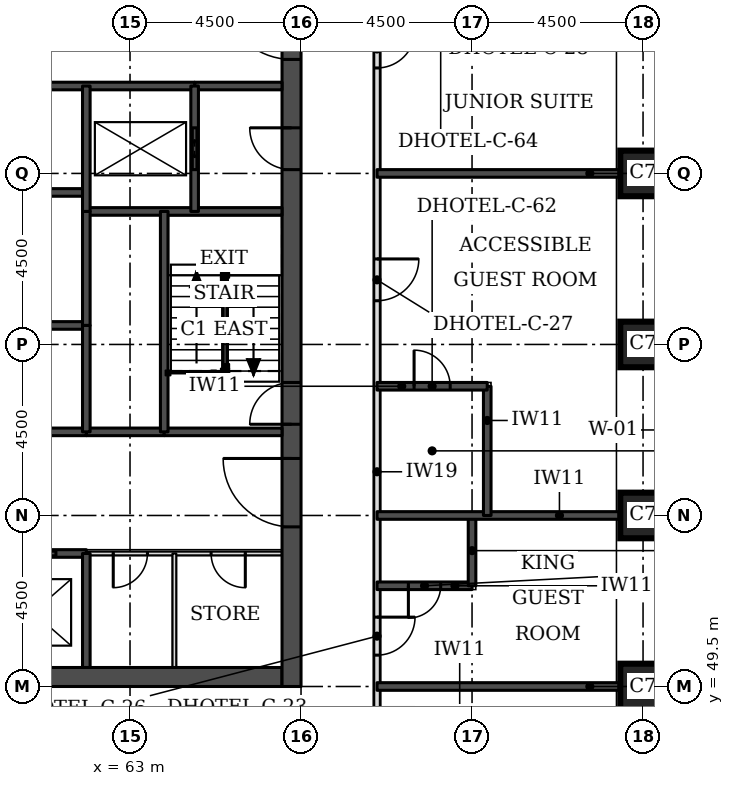
"""IFC4 building model, lengths in metres.
Left out: names, types, materials, properties, quantities, classifications, styles, units other than length and angle.
Written with IfcOpenShell. Run it as: python <this file> out.ifc"""

import sys

from ifc_helpers import new_model, si_unit, direction, frame, frame_2d, origin, origin_2d, place, context, subcontext, project, spatial, rectangle, extrude, element, fill, save


model = new_model("IFC4")
c1 = context("Model", 3, precision=1e-05, world=origin(), true_north=direction((0.0, 1.0)))
c2 = subcontext(c1, "Body", "Model", "MODEL_VIEW")
j1 = project(units=[si_unit("LENGTHUNIT", "METRE"), si_unit("PLANEANGLEUNIT", "RADIAN")], contexts=[c1])
p1 = place(None, origin())
s1 = spatial("IfcSite", under=j1, at=p1, CompositionType="ELEMENT")
p2 = place(p1, origin())
s2 = spatial("IfcBuilding", under=s1, at=p2, CompositionType="ELEMENT")
p3 = place(p2, frame((0.0, 0.0, 56.1)))
s3 = spatial("IfcBuildingStorey", under=s2, at=p3, CompositionType="ELEMENT", Elevation=56.1)
for number, where, z_axis, x_axis in (
    (1, (76.5, 49.5, 0.0), (0.0, 0.0, 1.0), (1.0, 0.0, 0.0)),
    (2, (76.5, 54.0, 0.0), (0.0, 0.0, 1.0), (1.0, 0.0, 0.0)),
    (3, (76.5, 58.5, 0.0), (0.0, 0.0, 1.0), (1.0, 0.0, 0.0)),
    (4, (76.5, 63.0, 0.0), (0.0, 0.0, 1.0), (1.0, 0.0, 0.0)),
):
    element("IfcColumn", number, at=place(p3, frame(where, z_axis=z_axis, x_axis=x_axis)), inside=s3, PredefinedType="COLUMN", context=c2, shape_type="SweptSolid", body=[
        extrude(rectangle(XDim=1.2, YDim=1.2, at=origin_2d()), origin(), (0.0, 0.0, 1.0), 3.3),
    ])
p4 = place(p3, frame((45.5, 49.75, 0.0), z_axis=(0.0, 0.0, 1.0), x_axis=(1.0, 0.0, 0.0)))
e5 = element("IfcWall", 5, at=p4, inside=s3, PredefinedType="SHEAR", context=c2, shape_type="SweptSolid", body=[
    extrude(rectangle(XDim=21.5, YDim=0.5, at=frame_2d((10.75, 0.0))), origin(), (0.0, 0.0, 1.0), 3.3),
])
p5 = place(p3, frame((67.25, 49.5, 0.0), z_axis=(0.0, 0.0, 1.0), x_axis=(0.0, 1.0, 0.0)))
e6 = element("IfcWall", 6, at=p5, inside=s3, PredefinedType="SHEAR", context=c2, shape_type="SweptSolid", body=[
    extrude(rectangle(XDim=22.5, YDim=0.5, at=frame_2d((11.25, 0.0))), origin(), (0.0, 0.0, 1.0), 3.3),
])
p6 = place(p5, frame((4.2, 0.0, 0.0)))
e7 = element("IfcOpeningElement", 7, at=p6, cuts=e6, PredefinedType="OPENING", context=c2, shape_type="SweptSolid", body=[
    extrude(rectangle(XDim=1.8, YDim=2.1, at=frame_2d((0.9, 1.05))), frame((0.0, 0.26, 0.0), z_axis=(0.0, -1.0, 0.0), x_axis=(1.0, 0.0, 0.0)), (0.0, 0.0, 1.0), 0.52),
])
p7 = place(p5, frame((6.9, 0.0, 0.0)))
e8 = element("IfcOpeningElement", 8, at=p7, cuts=e6, PredefinedType="OPENING", context=c2, shape_type="SweptSolid", body=[
    extrude(rectangle(XDim=1.1, YDim=2.1, at=frame_2d((0.55, 1.05))), frame((0.0, 0.26, 0.0), z_axis=(0.0, -1.0, 0.0), x_axis=(1.0, 0.0, 0.0)), (0.0, 0.0, 1.0), 0.52),
])
p8 = place(p5, frame((13.6, 0.0, 0.0)))
e9 = element("IfcOpeningElement", 9, at=p8, cuts=e6, PredefinedType="OPENING", context=c2, shape_type="SweptSolid", body=[
    extrude(rectangle(XDim=1.1, YDim=2.1, at=frame_2d((0.55, 1.05))), frame((0.0, 0.26, 0.0), z_axis=(0.0, -1.0, 0.0), x_axis=(1.0, 0.0, 0.0)), (0.0, 0.0, 1.0), 0.52),
])
p9 = place(p5, frame((16.5, 0.0, 0.0)))
e10 = element("IfcOpeningElement", 10, at=p9, cuts=e6, PredefinedType="OPENING", context=c2, shape_type="SweptSolid", body=[
    extrude(rectangle(XDim=1.8, YDim=2.1, at=frame_2d((0.9, 1.05))), frame((0.0, 0.26, 0.0), z_axis=(0.0, -1.0, 0.0), x_axis=(1.0, 0.0, 0.0)), (0.0, 0.0, 1.0), 0.52),
])
p10 = place(p3, frame((69.5, 47.5, 0.0), z_axis=(0.0, 0.0, 1.0), x_axis=(0.0, 1.0, 0.0)))
e11 = element("IfcWall", 11, at=p10, inside=s3, PredefinedType="PARTITIONING", context=c2, shape_type="SweptSolid", body=[
    extrude(rectangle(XDim=26.5, YDim=0.15, at=frame_2d((13.25, 0.0))), origin(), (0.0, 0.0, 1.0), 3.08),
])
p11 = place(p10, frame((25.053, 0.0, 0.0)))
e12 = element("IfcOpeningElement", 12, at=p11, cuts=e11, PredefinedType="OPENING", context=c2, shape_type="SweptSolid", body=[
    extrude(rectangle(XDim=1.0, YDim=2.1, at=frame_2d((0.5, 1.05))), frame((0.0, 0.085, 0.0), z_axis=(0.0, -1.0, 0.0), x_axis=(1.0, 0.0, 0.0)), (0.0, 0.0, 1.0), 0.17),
])
p12 = place(p10, frame((18.275, 0.0, 0.0)))
e13 = element("IfcOpeningElement", 13, at=p12, cuts=e11, PredefinedType="OPENING", context=c2, shape_type="SweptSolid", body=[
    extrude(rectangle(XDim=1.0, YDim=2.1, at=frame_2d((0.5, 1.05))), frame((0.0, 0.085, 0.0), z_axis=(0.0, -1.0, 0.0), x_axis=(1.0, 0.0, 0.0)), (0.0, 0.0, 1.0), 0.17),
])
p13 = place(p10, frame((12.15, 0.0, 0.0)))
e14 = element("IfcOpeningElement", 14, at=p13, cuts=e11, PredefinedType="OPENING", context=c2, shape_type="SweptSolid", body=[
    extrude(rectangle(XDim=1.1, YDim=2.1, at=frame_2d((0.55, 1.05))), frame((0.0, 0.085, 0.0), z_axis=(0.0, -1.0, 0.0), x_axis=(1.0, 0.0, 0.0)), (0.0, 0.0, 1.0), 0.17),
])
p14 = place(p10, frame((2.825, 0.0, 0.0)))
e15 = element("IfcOpeningElement", 15, at=p14, cuts=e11, PredefinedType="OPENING", context=c2, shape_type="SweptSolid", body=[
    extrude(rectangle(XDim=1.0, YDim=2.1, at=frame_2d((0.5, 1.05))), frame((0.0, 0.085, 0.0), z_axis=(0.0, -1.0, 0.0), x_axis=(1.0, 0.0, 0.0)), (0.0, 0.0, 1.0), 0.17),
])
p15 = place(p10, frame((0.447, 0.0, 0.0)))
e16 = element("IfcOpeningElement", 16, at=p15, cuts=e11, PredefinedType="OPENING", context=c2, shape_type="SweptSolid", body=[
    extrude(rectangle(XDim=1.0, YDim=2.1, at=frame_2d((0.5, 1.05))), frame((0.0, 0.085, 0.0), z_axis=(0.0, -1.0, 0.0), x_axis=(1.0, 0.0, 0.0)), (0.0, 0.0, 1.0), 0.17),
])
p16 = place(p3, frame((69.5, 49.5, 0.0), z_axis=(0.0, 0.0, 1.0), x_axis=(1.0, 0.0, 0.0)))
e17 = element("IfcWall", 17, at=p16, inside=s3, PredefinedType="SOLIDWALL", context=c2, shape_type="SweptSolid", body=[
    extrude(rectangle(XDim=6.4, YDim=0.2, at=frame_2d((3.2, 0.0))), origin(), (0.0, 0.0, 1.0), 3.08),
])
p17 = place(p3, frame((69.5, 52.15, 0.0), z_axis=(0.0, 0.0, 1.0), x_axis=(1.0, 0.0, 0.0)))
e18 = element("IfcWall", 18, at=p17, inside=s3, PredefinedType="SOLIDWALL", context=c2, shape_type="SweptSolid", body=[
    extrude(rectangle(XDim=2.5, YDim=0.2, at=frame_2d((1.25, 0.0))), origin(), (0.0, 0.0, 1.0), 3.08),
])
p18 = place(p17, frame((0.825, 0.0, 0.0)))
e19 = element("IfcOpeningElement", 19, at=p18, cuts=e18, PredefinedType="OPENING", context=c2, shape_type="SweptSolid", body=[
    extrude(rectangle(XDim=0.85, YDim=2.1, at=frame_2d((0.425, 1.05))), frame((0.0, 0.11, 0.0), z_axis=(0.0, -1.0, 0.0), x_axis=(1.0, 0.0, 0.0)), (0.0, 0.0, 1.0), 0.22),
])
p19 = place(p3, frame((72.0, 52.15, 0.0), z_axis=(0.0, 0.0, 1.0), x_axis=(0.0, 1.0, 0.0)))
e20 = element("IfcWall", 20, at=p19, inside=s3, PredefinedType="SOLIDWALL", context=c2, shape_type="SweptSolid", body=[
    extrude(rectangle(XDim=1.85, YDim=0.2, at=frame_2d((0.925, 0.0))), origin(), (0.0, 0.0, 1.0), 3.08),
])
p20 = place(p3, frame((69.5, 54.0, 0.0), z_axis=(0.0, 0.0, 1.0), x_axis=(1.0, 0.0, 0.0)))
e21 = element("IfcWall", 21, at=p20, inside=s3, PredefinedType="SOLIDWALL", context=c2, shape_type="SweptSolid", body=[
    extrude(rectangle(XDim=6.4, YDim=0.2, at=frame_2d((3.2, 0.0))), origin(), (0.0, 0.0, 1.0), 3.08),
])
p21 = place(p3, frame((72.4, 54.0, 0.0), z_axis=(0.0, 0.0, 1.0), x_axis=(0.0, 1.0, 0.0)))
e22 = element("IfcWall", 22, at=p21, inside=s3, PredefinedType="SOLIDWALL", context=c2, shape_type="SweptSolid", body=[
    extrude(rectangle(XDim=3.4, YDim=0.2, at=frame_2d((1.7, 0.0))), origin(), (0.0, 0.0, 1.0), 3.08),
])
p22 = place(p3, frame((69.5, 57.4, 0.0), z_axis=(0.0, 0.0, 1.0), x_axis=(1.0, 0.0, 0.0)))
e23 = element("IfcWall", 23, at=p22, inside=s3, PredefinedType="SOLIDWALL", context=c2, shape_type="SweptSolid", body=[
    extrude(rectangle(XDim=2.9, YDim=0.2, at=frame_2d((1.45, 0.0))), origin(), (0.0, 0.0, 1.0), 3.08),
])
p23 = place(p22, frame((0.975, 0.0, 0.0)))
e24 = element("IfcOpeningElement", 24, at=p23, cuts=e23, PredefinedType="OPENING", context=c2, shape_type="SweptSolid", body=[
    extrude(rectangle(XDim=0.95, YDim=2.1, at=frame_2d((0.475, 1.05))), frame((0.0, 0.11, 0.0), z_axis=(0.0, -1.0, 0.0), x_axis=(1.0, 0.0, 0.0)), (0.0, 0.0, 1.0), 0.22),
])
p24 = place(p3, frame((69.5, 63.0, 0.0), z_axis=(0.0, 0.0, 1.0), x_axis=(1.0, 0.0, 0.0)))
e25 = element("IfcWall", 25, at=p24, inside=s3, PredefinedType="SOLIDWALL", context=c2, shape_type="SweptSolid", body=[
    extrude(rectangle(XDim=6.4, YDim=0.2, at=frame_2d((3.2, 0.0))), origin(), (0.0, 0.0, 1.0), 3.08),
])
p25 = place(p3, frame((61.85, 53.0, 0.0), z_axis=(0.0, 0.0, 1.0), x_axis=(1.0, 0.0, 0.0)))
e26 = element("IfcWall", 26, at=p25, inside=s3, PredefinedType="PARTITIONING", context=c2, shape_type="SweptSolid", body=[
    extrude(rectangle(XDim=5.15, YDim=0.1, at=frame_2d((2.575, 0.0))), origin(), (0.0, 0.0, 1.0), 3.08),
])
p26 = place(p25, frame((3.284, 0.0, 0.0)))
e27 = element("IfcOpeningElement", 27, at=p26, cuts=e26, PredefinedType="OPENING", context=c2, shape_type="SweptSolid", body=[
    extrude(rectangle(XDim=0.9, YDim=2.1, at=frame_2d((0.45, 1.05))), frame((0.0, 0.06, 0.0), z_axis=(0.0, -1.0, 0.0), x_axis=(1.0, 0.0, 0.0)), (0.0, 0.0, 1.0), 0.12),
])
p27 = place(p25, frame((0.709, 0.0, 0.0)))
e28 = element("IfcOpeningElement", 28, at=p27, cuts=e26, PredefinedType="OPENING", context=c2, shape_type="SweptSolid", body=[
    extrude(rectangle(XDim=0.9, YDim=2.1, at=frame_2d((0.45, 1.05))), frame((0.0, 0.06, 0.0), z_axis=(0.0, -1.0, 0.0), x_axis=(1.0, 0.0, 0.0)), (0.0, 0.0, 1.0), 0.12),
])
p28 = place(p3, frame((50.65, 53.0, 0.0), z_axis=(0.0, 0.0, 1.0), x_axis=(1.0, 0.0, 0.0)))
e29 = element("IfcWall", 29, at=p28, inside=s3, PredefinedType="SOLIDWALL", context=c2, shape_type="SweptSolid", body=[
    extrude(rectangle(XDim=11.2, YDim=0.2, at=frame_2d((5.6, 0.0))), origin(), (0.0, 0.0, 1.0), 3.08),
])
p29 = place(p28, frame((0.8, 0.0, 0.0)))
e30 = element("IfcOpeningElement", 30, at=p29, cuts=e29, PredefinedType="OPENING", context=c2, shape_type="SweptSolid", body=[
    extrude(rectangle(XDim=1.2, YDim=2.1, at=frame_2d((0.6, 1.05))), frame((0.0, 0.11, 0.0), z_axis=(0.0, -1.0, 0.0), x_axis=(1.0, 0.0, 0.0)), (0.0, 0.0, 1.0), 0.22),
])
p30 = place(p28, frame((3.6, 0.0, 0.0)))
e31 = element("IfcOpeningElement", 31, at=p30, cuts=e29, PredefinedType="OPENING", context=c2, shape_type="SweptSolid", body=[
    extrude(rectangle(XDim=1.2, YDim=2.1, at=frame_2d((0.6, 1.05))), frame((0.0, 0.11, 0.0), z_axis=(0.0, -1.0, 0.0), x_axis=(1.0, 0.0, 0.0)), (0.0, 0.0, 1.0), 0.22),
])
p31 = place(p28, frame((6.4, 0.0, 0.0)))
e32 = element("IfcOpeningElement", 32, at=p31, cuts=e29, PredefinedType="OPENING", context=c2, shape_type="SweptSolid", body=[
    extrude(rectangle(XDim=1.2, YDim=2.1, at=frame_2d((0.6, 1.05))), frame((0.0, 0.11, 0.0), z_axis=(0.0, -1.0, 0.0), x_axis=(1.0, 0.0, 0.0)), (0.0, 0.0, 1.0), 0.22),
])
p32 = place(p28, frame((9.2, 0.0, 0.0)))
e33 = element("IfcOpeningElement", 33, at=p32, cuts=e29, PredefinedType="OPENING", context=c2, shape_type="SweptSolid", body=[
    extrude(rectangle(XDim=1.2, YDim=2.1, at=frame_2d((0.6, 1.05))), frame((0.0, 0.11, 0.0), z_axis=(0.0, -1.0, 0.0), x_axis=(1.0, 0.0, 0.0)), (0.0, 0.0, 1.0), 0.22),
])
p33 = place(p3, frame((61.85, 56.2, 0.0), z_axis=(0.0, 0.0, 1.0), x_axis=(1.0, 0.0, 0.0)))
e34 = element("IfcWall", 34, at=p33, inside=s3, PredefinedType="SOLIDWALL", context=c2, shape_type="SweptSolid", body=[
    extrude(rectangle(XDim=2.05, YDim=0.2, at=frame_2d((1.025, 0.0))), origin(), (0.0, 0.0, 1.0), 3.08),
])
p34 = place(p3, frame((50.65, 56.2, 0.0), z_axis=(0.0, 0.0, 1.0), x_axis=(1.0, 0.0, 0.0)))
e35 = element("IfcWall", 35, at=p34, inside=s3, PredefinedType="SOLIDWALL", context=c2, shape_type="SweptSolid", body=[
    extrude(rectangle(XDim=11.2, YDim=0.2, at=frame_2d((5.6, 0.0))), origin(), (0.0, 0.0, 1.0), 3.08),
])
p35 = place(p3, frame((63.9, 56.2, 0.0), z_axis=(0.0, 0.0, 1.0), x_axis=(1.0, 0.0, 0.0)))
e36 = element("IfcWall", 36, at=p35, inside=s3, PredefinedType="SOLIDWALL", context=c2, shape_type="SweptSolid", body=[
    extrude(rectangle(XDim=3.1, YDim=0.2, at=frame_2d((1.55, 0.0))), origin(), (0.0, 0.0, 1.0), 3.08),
])
p36 = place(p3, frame((50.65, 59.0, 0.0), z_axis=(0.0, 0.0, 1.0), x_axis=(1.0, 0.0, 0.0)))
e37 = element("IfcWall", 37, at=p36, inside=s3, PredefinedType="SOLIDWALL", context=c2, shape_type="SweptSolid", body=[
    extrude(rectangle(XDim=11.2, YDim=0.2, at=frame_2d((5.6, 0.0))), origin(), (0.0, 0.0, 1.0), 3.3),
])
p37 = place(p3, frame((61.85, 62.0, 0.0), z_axis=(0.0, 0.0, 1.0), x_axis=(1.0, 0.0, 0.0)))
e38 = element("IfcWall", 38, at=p37, inside=s3, PredefinedType="SOLIDWALL", context=c2, shape_type="SweptSolid", body=[
    extrude(rectangle(XDim=5.15, YDim=0.2, at=frame_2d((2.575, 0.0))), origin(), (0.0, 0.0, 1.0), 3.08),
])
p38 = place(p3, frame((50.65, 62.5, 0.0), z_axis=(0.0, 0.0, 1.0), x_axis=(1.0, 0.0, 0.0)))
e39 = element("IfcWall", 39, at=p38, inside=s3, PredefinedType="SOLIDWALL", context=c2, shape_type="SweptSolid", body=[
    extrude(rectangle(XDim=11.2, YDim=0.2, at=frame_2d((5.6, 0.0))), origin(), (0.0, 0.0, 1.0), 3.3),
])
p39 = place(p3, frame((64.7, 65.3, 0.0), z_axis=(0.0, 0.0, 1.0), x_axis=(1.0, 0.0, 0.0)))
e40 = element("IfcWall", 40, at=p39, inside=s3, PredefinedType="SOLIDWALL", context=c2, shape_type="SweptSolid", body=[
    extrude(rectangle(XDim=2.3, YDim=0.2, at=frame_2d((1.15, 0.0))), origin(), (0.0, 0.0, 1.0), 3.08),
])
p40 = place(p3, frame((47.8, 65.3, 0.0), z_axis=(0.0, 0.0, 1.0), x_axis=(1.0, 0.0, 0.0)))
e41 = element("IfcWall", 41, at=p40, inside=s3, PredefinedType="SOLIDWALL", context=c2, shape_type="SweptSolid", body=[
    extrude(rectangle(XDim=16.9, YDim=0.2, at=frame_2d((8.45, 0.0))), origin(), (0.0, 0.0, 1.0), 3.08),
])
p41 = place(p3, frame((61.85, 59.0, 0.0), z_axis=(0.0, 0.0, 1.0), x_axis=(0.0, 1.0, 0.0)))
e42 = element("IfcWall", 42, at=p41, inside=s3, PredefinedType="SOLIDWALL", context=c2, shape_type="SweptSolid", body=[
    extrude(rectangle(XDim=3.0, YDim=0.2, at=frame_2d((1.5, 0.0))), origin(), (0.0, 0.0, 1.0), 3.3),
])
p42 = place(p3, frame((61.85, 50.0, 0.0), z_axis=(0.0, 0.0, 1.0), x_axis=(0.0, 1.0, 0.0)))
e43 = element("IfcWall", 43, at=p42, inside=s3, PredefinedType="SOLIDWALL", context=c2, shape_type="SweptSolid", body=[
    extrude(rectangle(XDim=3.0, YDim=0.2, at=frame_2d((1.5, 0.0))), origin(), (0.0, 0.0, 1.0), 3.08),
])
p43 = place(p3, frame((61.85, 56.2, 0.0), z_axis=(0.0, 0.0, 1.0), x_axis=(0.0, 1.0, 0.0)))
e44 = element("IfcWall", 44, at=p43, inside=s3, PredefinedType="SOLIDWALL", context=c2, shape_type="SweptSolid", body=[
    extrude(rectangle(XDim=2.8, YDim=0.2, at=frame_2d((1.4, 0.0))), origin(), (0.0, 0.0, 1.0), 3.08),
])
p44 = place(p3, frame((61.85, 62.0, 0.0), z_axis=(0.0, 0.0, 1.0), x_axis=(0.0, 1.0, 0.0)))
e45 = element("IfcWall", 45, at=p44, inside=s3, PredefinedType="SOLIDWALL", context=c2, shape_type="SweptSolid", body=[
    extrude(rectangle(XDim=3.3, YDim=0.2, at=frame_2d((1.65, 0.0))), origin(), (0.0, 0.0, 1.0), 3.08),
])
p45 = place(p3, frame((63.9, 56.2, 0.0), z_axis=(0.0, 0.0, 1.0), x_axis=(0.0, 1.0, 0.0)))
e46 = element("IfcWall", 46, at=p45, inside=s3, PredefinedType="SOLIDWALL", context=c2, shape_type="SweptSolid", body=[
    extrude(rectangle(XDim=5.8, YDim=0.2, at=frame_2d((2.9, 0.0))), origin(), (0.0, 0.0, 1.0), 3.08),
])
p46 = place(p3, frame((64.167, 50.0, 0.0), z_axis=(0.0, 0.0, 1.0), x_axis=(0.0, 1.0, 0.0)))
e47 = element("IfcWall", 47, at=p46, inside=s3, PredefinedType="PARTITIONING", context=c2, shape_type="SweptSolid", body=[
    extrude(rectangle(XDim=3.0, YDim=0.1, at=frame_2d((1.5, 0.0))), origin(), (0.0, 0.0, 1.0), 3.08),
])
p47 = place(p3, frame((64.7, 62.0, 0.0), z_axis=(0.0, 0.0, 1.0), x_axis=(0.0, 1.0, 0.0)))
e48 = element("IfcWall", 48, at=p47, inside=s3, PredefinedType="SOLIDWALL", context=c2, shape_type="SweptSolid", body=[
    extrude(rectangle(XDim=3.3, YDim=0.2, at=frame_2d((1.65, 0.0))), origin(), (0.0, 0.0, 1.0), 3.08),
])
p48 = place(p47, frame((1.1, 0.0, 0.0)))
e49 = element("IfcOpeningElement", 49, at=p48, cuts=e48, PredefinedType="OPENING", context=c2, shape_type="SweptSolid", body=[
    extrude(rectangle(XDim=1.1, YDim=2.1, at=frame_2d((0.55, 1.05))), frame((0.0, 0.11, 0.0), z_axis=(0.0, -1.0, 0.0), x_axis=(1.0, 0.0, 0.0)), (0.0, 0.0, 1.0), 0.22),
])
p49 = place(p12, frame((1.0, 0.0, 0.0), z_axis=(0.0, 0.0, 1.0), x_axis=(-1.0, 0.0, 0.0)))
e50 = element("IfcDoor", 50, at=p49, inside=s3, OperationType="SINGLE_SWING_LEFT", PredefinedType="DOOR", context=c2, shape_type="SweptSolid", body=[
    extrude(rectangle(XDim=1.0, YDim=2.1, at=frame_2d((0.5, 1.05))), frame((0.0, 0.025, 0.0), z_axis=(0.0, -1.0, 0.0), x_axis=(1.0, 0.0, 0.0)), (0.0, 0.0, 1.0), 0.05),
])
fill(e13, e50)
p50 = place(p13, frame((1.1, 0.0, 0.0), z_axis=(0.0, 0.0, 1.0), x_axis=(-1.0, 0.0, 0.0)))
e51 = element("IfcDoor", 51, at=p50, inside=s3, OperationType="SINGLE_SWING_LEFT", PredefinedType="DOOR", context=c2, shape_type="SweptSolid", body=[
    extrude(rectangle(XDim=1.1, YDim=2.1, at=frame_2d((0.55, 1.05))), frame((0.0, 0.025, 0.0), z_axis=(0.0, -1.0, 0.0), x_axis=(1.0, 0.0, 0.0)), (0.0, 0.0, 1.0), 0.05),
])
fill(e14, e51)
p51 = place(p23, origin())
e52 = element("IfcDoor", 52, at=p51, inside=s3, OperationType="SINGLE_SWING_LEFT", PredefinedType="DOOR", context=c2, shape_type="SweptSolid", body=[
    extrude(rectangle(XDim=0.95, YDim=2.1, at=frame_2d((0.475, 1.05))), frame((0.0, 0.025, 0.0), z_axis=(0.0, -1.0, 0.0), x_axis=(1.0, 0.0, 0.0)), (0.0, 0.0, 1.0), 0.05),
])
fill(e24, e52)
p52 = place(p14, frame((1.0, 0.0, 0.0), z_axis=(0.0, 0.0, 1.0), x_axis=(-1.0, 0.0, 0.0)))
e53 = element("IfcDoor", 53, at=p52, inside=s3, OperationType="SINGLE_SWING_LEFT", PredefinedType="DOOR", context=c2, shape_type="SweptSolid", body=[
    extrude(rectangle(XDim=1.0, YDim=2.1, at=frame_2d((0.5, 1.05))), frame((0.0, 0.025, 0.0), z_axis=(0.0, -1.0, 0.0), x_axis=(1.0, 0.0, 0.0)), (0.0, 0.0, 1.0), 0.05),
])
fill(e15, e53)
p53 = place(p18, frame((0.85, 0.0, 0.0), z_axis=(0.0, 0.0, 1.0), x_axis=(-1.0, 0.0, 0.0)))
e54 = element("IfcDoor", 54, at=p53, inside=s3, OperationType="SINGLE_SWING_RIGHT", PredefinedType="DOOR", context=c2, shape_type="SweptSolid", body=[
    extrude(rectangle(XDim=0.85, YDim=2.1, at=frame_2d((0.425, 1.05))), frame((0.0, 0.025, 0.0), z_axis=(0.0, -1.0, 0.0), x_axis=(1.0, 0.0, 0.0)), (0.0, 0.0, 1.0), 0.05),
])
fill(e19, e54)
p54 = place(p32, origin())
e55 = element("IfcDoor", 55, at=p54, inside=s3, OperationType="DOUBLE_DOOR_SLIDING", PredefinedType="DOOR", context=c2, shape_type="SweptSolid", body=[
    extrude(rectangle(XDim=1.2, YDim=2.1, at=frame_2d((0.6, 1.05))), frame((0.0, 0.025, 0.0), z_axis=(0.0, -1.0, 0.0), x_axis=(1.0, 0.0, 0.0)), (0.0, 0.0, 1.0), 0.05),
])
fill(e33, e55)
p55 = place(p48, origin())
e56 = element("IfcDoor", 56, at=p55, inside=s3, OperationType="DOUBLE_DOOR_SLIDING", PredefinedType="DOOR", context=c2, shape_type="SweptSolid", body=[
    extrude(rectangle(XDim=1.1, YDim=2.1, at=frame_2d((0.55, 1.05))), frame((0.0, 0.025, 0.0), z_axis=(0.0, -1.0, 0.0), x_axis=(1.0, 0.0, 0.0)), (0.0, 0.0, 1.0), 0.05),
])
fill(e49, e56)
p56 = place(p6, origin())
e57 = element("IfcDoor", 57, at=p56, inside=s3, OperationType="SINGLE_SWING_RIGHT", PredefinedType="DOOR", context=c2, shape_type="SweptSolid", body=[
    extrude(rectangle(XDim=1.8, YDim=2.1, at=frame_2d((0.9, 1.05))), frame((0.0, 0.025, 0.0), z_axis=(0.0, -1.0, 0.0), x_axis=(1.0, 0.0, 0.0)), (0.0, 0.0, 1.0), 0.05),
])
fill(e7, e57)
p57 = place(p7, origin())
e58 = element("IfcDoor", 58, at=p57, inside=s3, OperationType="SINGLE_SWING_LEFT", PredefinedType="DOOR", context=c2, shape_type="SweptSolid", body=[
    extrude(rectangle(XDim=1.1, YDim=2.1, at=frame_2d((0.55, 1.05))), frame((0.0, 0.025, 0.0), z_axis=(0.0, -1.0, 0.0), x_axis=(1.0, 0.0, 0.0)), (0.0, 0.0, 1.0), 0.05),
])
fill(e8, e58)
p58 = place(p8, origin())
e59 = element("IfcDoor", 59, at=p58, inside=s3, OperationType="SINGLE_SWING_RIGHT", PredefinedType="DOOR", context=c2, shape_type="SweptSolid", body=[
    extrude(rectangle(XDim=1.1, YDim=2.1, at=frame_2d((0.55, 1.05))), frame((0.0, 0.025, 0.0), z_axis=(0.0, -1.0, 0.0), x_axis=(1.0, 0.0, 0.0)), (0.0, 0.0, 1.0), 0.05),
])
fill(e9, e59)
p59 = place(p9, origin())
e60 = element("IfcDoor", 60, at=p59, inside=s3, OperationType="SINGLE_SWING_RIGHT", PredefinedType="DOOR", context=c2, shape_type="SweptSolid", body=[
    extrude(rectangle(XDim=1.8, YDim=2.1, at=frame_2d((0.9, 1.05))), frame((0.0, 0.025, 0.0), z_axis=(0.0, -1.0, 0.0), x_axis=(1.0, 0.0, 0.0)), (0.0, 0.0, 1.0), 0.05),
])
fill(e10, e60)
p60 = place(p26, frame((0.9, 0.0, 0.0), z_axis=(0.0, 0.0, 1.0), x_axis=(-1.0, 0.0, 0.0)))
e61 = element("IfcDoor", 61, at=p60, inside=s3, OperationType="SINGLE_SWING_LEFT", PredefinedType="DOOR", context=c2, shape_type="SweptSolid", body=[
    extrude(rectangle(XDim=0.9, YDim=2.1, at=frame_2d((0.45, 1.05))), frame((0.0, 0.025, 0.0), z_axis=(0.0, -1.0, 0.0), x_axis=(1.0, 0.0, 0.0)), (0.0, 0.0, 1.0), 0.05),
])
fill(e27, e61)
p61 = place(p27, frame((0.9, 0.0, 0.0), z_axis=(0.0, 0.0, 1.0), x_axis=(-1.0, 0.0, 0.0)))
e62 = element("IfcDoor", 62, at=p61, inside=s3, OperationType="SINGLE_SWING_RIGHT", PredefinedType="DOOR", context=c2, shape_type="SweptSolid", body=[
    extrude(rectangle(XDim=0.9, YDim=2.1, at=frame_2d((0.45, 1.05))), frame((0.0, 0.025, 0.0), z_axis=(0.0, -1.0, 0.0), x_axis=(1.0, 0.0, 0.0)), (0.0, 0.0, 1.0), 0.05),
])
fill(e28, e62)
save(model, sys.argv[1])
